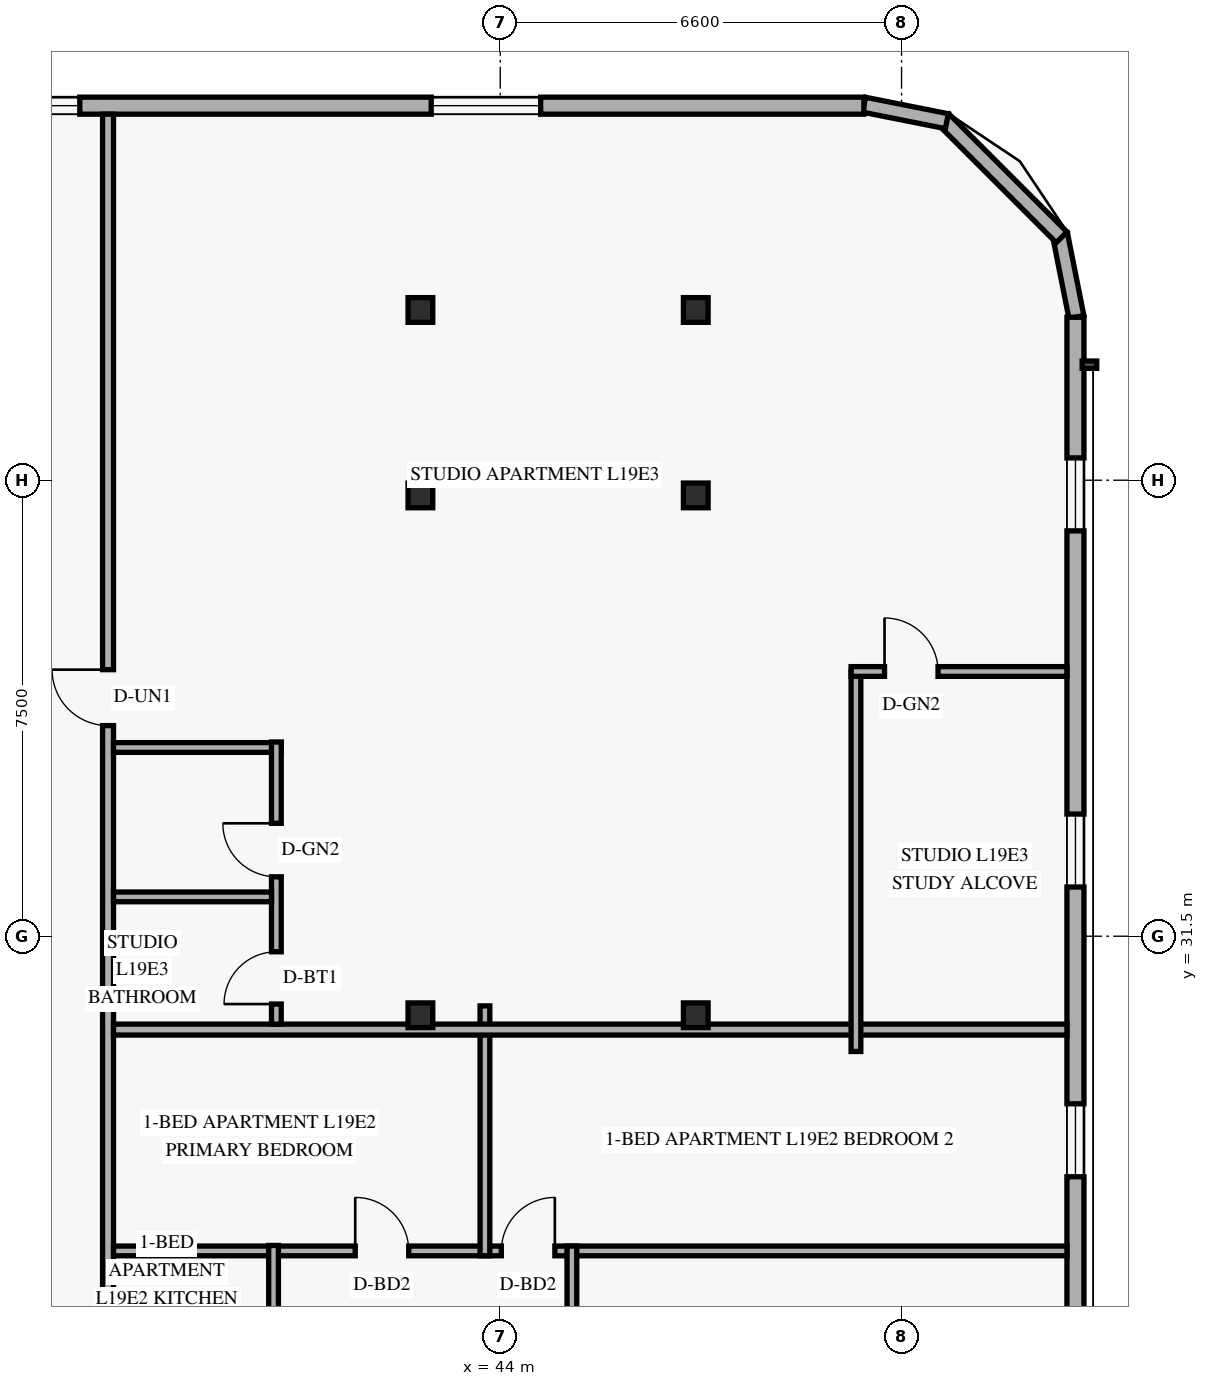
"""IFC4 building model, lengths in metres.
Left out: names, types, materials, properties, quantities, classifications, styles, units other than length and angle.
Written with IfcOpenShell. Run it as: python <this file> out.ifc"""

import sys

from ifc_helpers import new_model, si_unit, direction, frame, frame_2d, origin, origin_2d, place, context, subcontext, project, spatial, rectangle, hollow_rectangle, extrude, element, fill, save


model = new_model("IFC4")
c1 = context("Model", 3, precision=1e-05, world=origin(), true_north=direction((0.0, 1.0)))
c2 = subcontext(c1, "Body", "Model", "MODEL_VIEW")
j1 = project(units=[si_unit("LENGTHUNIT", "METRE"), si_unit("PLANEANGLEUNIT", "RADIAN")], contexts=[c1])
p1 = place(None, origin())
s1 = spatial("IfcSite", under=j1, at=p1, CompositionType="ELEMENT")
p2 = place(p1, origin())
s2 = spatial("IfcBuilding", under=s1, at=p2, CompositionType="ELEMENT")
p3 = place(p2, frame((0.0, 0.0, 76.8)))
s3 = spatial("IfcBuildingStorey", under=s2, at=p3, CompositionType="ELEMENT", Elevation=76.8)
for number, where, z_axis, x_axis in (
    (1, (42.624, 30.2, 0.0), (0.035, 0.0, 0.999), (0.0, 1.0, 0.0)),
    (2, (42.624, 38.75, 0.0), (0.035, 0.0, 0.999), (0.0, 1.0, 0.0)),
    (3, (42.624, 41.8, 0.0), (0.035, 0.0, 0.999), (0.0, 1.0, 0.0)),
):
    element("IfcColumn", number, at=place(p3, frame(where, z_axis=z_axis, x_axis=x_axis)), inside=s3, PredefinedType="COLUMN", context=c2, shape_type="SweptSolid", body=[
        extrude(hollow_rectangle(XDim=0.406, YDim=0.406, WallThickness=0.016, at=origin_2d()), origin(), (0.0, 0.0, 1.0), 3.602),
    ])
for number, where, z_axis, x_axis in (
    (4, (47.111, 30.2, 0.0), (0.058, 0.0, 0.998), (0.0, 1.0, 0.0)),
    (5, (47.111, 38.75, 0.0), (0.058, 0.0, 0.998), (0.0, 1.0, 0.0)),
    (6, (47.111, 41.8, 0.0), (0.058, 0.0, 0.998), (0.0, 1.0, 0.0)),
):
    element("IfcColumn", number, at=place(p3, frame(where, z_axis=z_axis, x_axis=x_axis)), inside=s3, PredefinedType="COLUMN", context=c2, shape_type="SweptSolid", body=[
        extrude(hollow_rectangle(XDim=0.406, YDim=0.406, WallThickness=0.016, at=origin_2d()), origin(), (0.0, 0.0, 1.0), 3.606),
    ])
p4 = place(p3, frame((53.476, 41.684, 0.0), z_axis=(0.0, 0.0, 1.0), x_axis=(-0.195000137217, 0.980803214965, 0.0)))
e7 = element("IfcWall", 7, at=p4, inside=s3, PredefinedType="SOLIDWALL", context=c2, shape_type="SweptSolid", body=[
    extrude(rectangle(XDim=1.388, YDim=0.25, at=frame_2d((0.694, 0.0))), origin(), (0.0, 0.0, 1.0), 3.36),
])
p5 = place(p3, frame((53.232, 42.995, 0.0), z_axis=(0.0, 0.0, 1.0), x_axis=(-0.707151344399, 0.707062215165, 0.0)))
e8 = element("IfcWall", 8, at=p5, inside=s3, PredefinedType="SOLIDWALL", context=c2, shape_type="SweptSolid", body=[
    extrude(rectangle(XDim=2.739, YDim=0.25, at=frame_2d((1.37, 0.0))), origin(), (0.0, 0.0, 1.0), 3.36),
])
p6 = place(p3, frame((51.345, 44.905, 0.0), z_axis=(0.0, 0.0, 1.0), x_axis=(-0.980809899341, 0.19496651342, 0.0)))
e9 = element("IfcWall", 9, at=p6, inside=s3, PredefinedType="SOLIDWALL", context=c2, shape_type="SweptSolid", body=[
    extrude(rectangle(XDim=1.389, YDim=0.25, at=frame_2d((0.694, 0.0))), origin(), (0.0, 0.0, 1.0), 3.36),
])
p7 = place(p3, frame((53.46, 6.32, 0.0), z_axis=(0.0, 0.0, 1.0), x_axis=(0.0, 1.0, 0.0)))
e10 = element("IfcWall", 10, at=p7, inside=s3, PredefinedType="SOLIDWALL", context=c2, shape_type="SweptSolid", body=[
    extrude(rectangle(XDim=35.36, YDim=0.28, at=frame_2d((17.68, 0.0))), origin(), (0.0, 0.0, 1.0), 3.36),
])
p8 = place(p7, frame((4.24, 0.0, 0.85)))
e11 = element("IfcOpeningElement", 11, at=p8, cuts=e10, PredefinedType="OPENING", context=c2, shape_type="SweptSolid", body=[
    extrude(rectangle(XDim=1.2, YDim=1.5, at=frame_2d((0.6, 0.75))), frame((0.0, 0.15, 0.0), z_axis=(0.0, -1.0, 0.0), x_axis=(1.0, 0.0, 0.0)), (0.0, 0.0, 1.0), 0.3),
])
p9 = place(p7, frame((13.982, 0.0, 0.85)))
e12 = element("IfcOpeningElement", 12, at=p9, cuts=e10, PredefinedType="OPENING", context=c2, shape_type="SweptSolid", body=[
    extrude(rectangle(XDim=1.2, YDim=1.5, at=frame_2d((0.6, 0.75))), frame((0.0, 0.15, 0.0), z_axis=(0.0, -1.0, 0.0), x_axis=(1.0, 0.0, 0.0)), (0.0, 0.0, 1.0), 0.3),
])
p10 = place(p7, frame((21.224, 0.0, 0.85)))
e13 = element("IfcOpeningElement", 13, at=p10, cuts=e10, PredefinedType="OPENING", context=c2, shape_type="SweptSolid", body=[
    extrude(rectangle(XDim=1.2, YDim=1.5, at=frame_2d((0.6, 0.75))), frame((0.0, 0.15, 0.0), z_axis=(0.0, -1.0, 0.0), x_axis=(1.0, 0.0, 0.0)), (0.0, 0.0, 1.0), 0.3),
])
p11 = place(p7, frame((25.989, 0.0, 0.85)))
e14 = element("IfcOpeningElement", 14, at=p11, cuts=e10, PredefinedType="OPENING", context=c2, shape_type="SweptSolid", body=[
    extrude(rectangle(XDim=1.2, YDim=1.5, at=frame_2d((0.6, 0.75))), frame((0.0, 0.15, 0.0), z_axis=(0.0, -1.0, 0.0), x_axis=(1.0, 0.0, 0.0)), (0.0, 0.0, 1.0), 0.3),
])
p12 = place(p7, frame((31.847, 0.0, 0.85)))
e15 = element("IfcOpeningElement", 15, at=p12, cuts=e10, PredefinedType="OPENING", context=c2, shape_type="SweptSolid", body=[
    extrude(rectangle(XDim=1.2, YDim=1.5, at=frame_2d((0.6, 0.75))), frame((0.0, 0.15, 0.0), z_axis=(0.0, -1.0, 0.0), x_axis=(1.0, 0.0, 0.0)), (0.0, 0.0, 1.0), 0.3),
])
p13 = place(p3, frame((49.98, 45.16, 0.0), z_axis=(0.0, 0.0, 1.0), x_axis=(-1.0, 0.0, 0.0)))
e16 = element("IfcWall", 16, at=p13, inside=s3, PredefinedType="SOLIDWALL", context=c2, shape_type="SweptSolid", body=[
    extrude(rectangle(XDim=36.56, YDim=0.28, at=frame_2d((18.28, 0.0))), origin(), (0.0, 0.0, 1.0), 3.36),
])
p14 = place(p13, frame((31.545, 0.0, 0.85)))
e17 = element("IfcOpeningElement", 17, at=p14, cuts=e16, PredefinedType="OPENING", context=c2, shape_type="SweptSolid", body=[
    extrude(rectangle(XDim=1.8, YDim=1.6, at=frame_2d((0.9, 0.8))), frame((0.0, 0.15, 0.0), z_axis=(0.0, -1.0, 0.0), x_axis=(1.0, 0.0, 0.0)), (0.0, 0.0, 1.0), 0.3),
])
p15 = place(p13, frame((26.68, 0.0, 0.85)))
e18 = element("IfcOpeningElement", 18, at=p15, cuts=e16, PredefinedType="OPENING", context=c2, shape_type="SweptSolid", body=[
    extrude(rectangle(XDim=1.2, YDim=1.5, at=frame_2d((0.6, 0.75))), frame((0.0, 0.15, 0.0), z_axis=(0.0, -1.0, 0.0), x_axis=(1.0, 0.0, 0.0)), (0.0, 0.0, 1.0), 0.3),
])
p16 = place(p13, frame((22.237, 0.0, 0.85)))
e19 = element("IfcOpeningElement", 19, at=p16, cuts=e16, PredefinedType="OPENING", context=c2, shape_type="SweptSolid", body=[
    extrude(rectangle(XDim=1.8, YDim=1.6, at=frame_2d((0.9, 0.8))), frame((0.0, 0.15, 0.0), z_axis=(0.0, -1.0, 0.0), x_axis=(1.0, 0.0, 0.0)), (0.0, 0.0, 1.0), 0.3),
])
p17 = place(p13, frame((16.402, 0.0, 0.85)))
e20 = element("IfcOpeningElement", 20, at=p17, cuts=e16, PredefinedType="OPENING", context=c2, shape_type="SweptSolid", body=[
    extrude(rectangle(XDim=1.8, YDim=1.6, at=frame_2d((0.9, 0.8))), frame((0.0, 0.15, 0.0), z_axis=(0.0, -1.0, 0.0), x_axis=(1.0, 0.0, 0.0)), (0.0, 0.0, 1.0), 0.3),
])
p18 = place(p13, frame((12.895, 0.0, 0.85)))
e21 = element("IfcOpeningElement", 21, at=p18, cuts=e16, PredefinedType="OPENING", context=c2, shape_type="SweptSolid", body=[
    extrude(rectangle(XDim=1.2, YDim=1.5, at=frame_2d((0.6, 0.75))), frame((0.0, 0.15, 0.0), z_axis=(0.0, -1.0, 0.0), x_axis=(1.0, 0.0, 0.0)), (0.0, 0.0, 1.0), 0.3),
])
p19 = place(p13, frame((5.315, 0.0, 0.85)))
e22 = element("IfcOpeningElement", 22, at=p19, cuts=e16, PredefinedType="OPENING", context=c2, shape_type="SweptSolid", body=[
    extrude(rectangle(XDim=1.8, YDim=1.6, at=frame_2d((0.9, 0.8))), frame((0.0, 0.15, 0.0), z_axis=(0.0, -1.0, 0.0), x_axis=(1.0, 0.0, 0.0)), (0.0, 0.0, 1.0), 0.3),
])
p20 = place(p3, frame((37.55, 2.98, 0.0), z_axis=(0.0, 0.0, 1.0), x_axis=(0.0, 1.0, 0.0)))
e23 = element("IfcWall", 23, at=p20, inside=s3, PredefinedType="STANDARD", context=c2, shape_type="SweptSolid", body=[
    extrude(rectangle(XDim=42.04, YDim=0.18, at=frame_2d((21.02, 0.0))), origin(), (0.0, 0.0, 1.0), 2.731),
])
p21 = place(p20, frame((8.898, 0.0, 0.0)))
e24 = element("IfcOpeningElement", 24, at=p21, cuts=e23, PredefinedType="OPENING", context=c2, shape_type="SweptSolid", body=[
    extrude(rectangle(XDim=0.92, YDim=2.15, at=frame_2d((0.46, 1.075))), frame((0.0, 0.1, 0.0), z_axis=(0.0, -1.0, 0.0), x_axis=(1.0, 0.0, 0.0)), (0.0, 0.0, 1.0), 0.2),
])
p22 = place(p20, frame((17.337, 0.0, 0.0)))
e25 = element("IfcOpeningElement", 25, at=p22, cuts=e23, PredefinedType="OPENING", context=c2, shape_type="SweptSolid", body=[
    extrude(rectangle(XDim=0.92, YDim=2.15, at=frame_2d((0.46, 1.075))), frame((0.0, 0.1, 0.0), z_axis=(0.0, -1.0, 0.0), x_axis=(1.0, 0.0, 0.0)), (0.0, 0.0, 1.0), 0.2),
])
p23 = place(p20, frame((31.984, 0.0, 0.0)))
e26 = element("IfcOpeningElement", 26, at=p23, cuts=e23, PredefinedType="OPENING", context=c2, shape_type="SweptSolid", body=[
    extrude(rectangle(XDim=0.92, YDim=2.15, at=frame_2d((0.46, 1.075))), frame((0.0, 0.1, 0.0), z_axis=(0.0, -1.0, 0.0), x_axis=(1.0, 0.0, 0.0)), (0.0, 0.0, 1.0), 0.2),
])
p24 = place(p3, frame((37.64, 26.324, 0.0), z_axis=(0.0, 0.0, 1.0), x_axis=(1.0, 0.0, 0.0)))
e27 = element("IfcWall", 27, at=p24, inside=s3, PredefinedType="PARTITIONING", context=c2, shape_type="SweptSolid", body=[
    extrude(rectangle(XDim=15.68, YDim=0.16, at=frame_2d((7.84, 0.0))), origin(), (0.0, 0.0, 1.0), 2.731),
])
p25 = place(p24, frame((3.975, 0.0, 0.0)))
e28 = element("IfcOpeningElement", 28, at=p25, cuts=e27, PredefinedType="OPENING", context=c2, shape_type="SweptSolid", body=[
    extrude(rectangle(XDim=0.88, YDim=2.14, at=frame_2d((0.44, 1.07))), frame((0.0, 0.09, 0.0), z_axis=(0.0, -1.0, 0.0), x_axis=(1.0, 0.0, 0.0)), (0.0, 0.0, 1.0), 0.18),
])
p26 = place(p24, frame((6.378, 0.0, 0.0)))
e29 = element("IfcOpeningElement", 29, at=p26, cuts=e27, PredefinedType="OPENING", context=c2, shape_type="SweptSolid", body=[
    extrude(rectangle(XDim=0.88, YDim=2.14, at=frame_2d((0.44, 1.07))), frame((0.0, 0.09, 0.0), z_axis=(0.0, -1.0, 0.0), x_axis=(1.0, 0.0, 0.0)), (0.0, 0.0, 1.0), 0.18),
])
p27 = place(p3, frame((40.272, 21.527, 0.0), z_axis=(0.0, 0.0, 1.0), x_axis=(0.0, 1.0, 0.0)))
e30 = element("IfcWall", 30, at=p27, inside=s3, PredefinedType="PLUMBINGWALL", context=c2, shape_type="SweptSolid", body=[
    extrude(rectangle(XDim=4.887, YDim=0.16, at=frame_2d((2.443, 0.0))), origin(), (0.0, 0.0, 1.0), 3.36),
])
p28 = place(p27, frame((0.42, 0.0, 0.0)))
e31 = element("IfcOpeningElement", 31, at=p28, cuts=e30, PredefinedType="OPENING", context=c2, shape_type="SweptSolid", body=[
    extrude(rectangle(XDim=0.86, YDim=2.12, at=frame_2d((0.43, 1.06))), frame((0.0, 0.09, 0.0), z_axis=(0.0, -1.0, 0.0), x_axis=(1.0, 0.0, 0.0)), (0.0, 0.0, 1.0), 0.18),
])
p29 = place(p27, frame((2.585, 0.0, 0.0)))
e32 = element("IfcOpeningElement", 32, at=p29, cuts=e30, PredefinedType="OPENING", context=c2, shape_type="SweptSolid", body=[
    extrude(rectangle(XDim=0.88, YDim=2.12, at=frame_2d((0.44, 1.06))), frame((0.0, 0.09, 0.0), z_axis=(0.0, -1.0, 0.0), x_axis=(1.0, 0.0, 0.0)), (0.0, 0.0, 1.0), 0.18),
])
p30 = place(p3, frame((45.178, 15.12, 0.0), z_axis=(0.0, 0.0, 1.0), x_axis=(0.0, 1.0, 0.0)))
e33 = element("IfcWall", 33, at=p30, inside=s3, PredefinedType="PARTITIONING", context=c2, shape_type="SweptSolid", body=[
    extrude(rectangle(XDim=11.284, YDim=0.16, at=frame_2d((5.642, 0.0))), origin(), (0.0, 0.0, 1.0), 2.731),
])
p31 = place(p30, frame((4.882, 0.0, 0.0)))
e34 = element("IfcOpeningElement", 34, at=p31, cuts=e33, PredefinedType="OPENING", context=c2, shape_type="SweptSolid", body=[
    extrude(rectangle(XDim=0.95, YDim=2.15, at=frame_2d((0.475, 1.075))), frame((0.0, 0.09, 0.0), z_axis=(0.0, -1.0, 0.0), x_axis=(1.0, 0.0, 0.0)), (0.0, 0.0, 1.0), 0.18),
])
p32 = place(p3, frame((43.748, 26.244, 0.0), z_axis=(0.0, 0.0, 1.0), x_axis=(0.0, 1.0, 0.0)))
e35 = element("IfcWall", 35, at=p32, inside=s3, PredefinedType="PARTITIONING", context=c2, shape_type="SweptSolid", body=[
    extrude(rectangle(XDim=4.11, YDim=0.16, at=frame_2d((2.055, 0.0))), origin(), (0.0, 0.0, 1.0), 2.731),
])
p33 = place(p3, frame((37.64, 29.964, 0.0), z_axis=(0.0, 0.0, 1.0), x_axis=(1.0, 0.0, 0.0)))
e36 = element("IfcWall", 36, at=p33, inside=s3, PredefinedType="PARTITIONING", context=c2, shape_type="SweptSolid", body=[
    extrude(rectangle(XDim=15.68, YDim=0.18, at=frame_2d((7.84, 0.0))), origin(), (0.0, 0.0, 1.0), 2.731),
])
p34 = place(p3, frame((37.64, 34.604, 0.0), z_axis=(0.0, 0.0, 1.0), x_axis=(1.0, 0.0, 0.0)))
e37 = element("IfcWall", 37, at=p34, inside=s3, PredefinedType="PLUMBINGWALL", context=c2, shape_type="SweptSolid", body=[
    extrude(rectangle(XDim=2.758, YDim=0.16, at=frame_2d((1.379, 0.0))), origin(), (0.0, 0.0, 1.0), 2.988),
])
p35 = place(p3, frame((40.318, 30.054, 0.0), z_axis=(0.0, 0.0, 1.0), x_axis=(0.0, 1.0, 0.0)))
e38 = element("IfcWall", 38, at=p35, inside=s3, PredefinedType="PLUMBINGWALL", context=c2, shape_type="SweptSolid", body=[
    extrude(rectangle(XDim=4.64, YDim=0.16, at=frame_2d((2.32, 0.0))), origin(), (0.0, 0.0, 1.0), 2.731),
])
p36 = place(p35, frame((0.33, 0.0, 0.0)))
e39 = element("IfcOpeningElement", 39, at=p36, cuts=e38, PredefinedType="OPENING", context=c2, shape_type="SweptSolid", body=[
    extrude(rectangle(XDim=0.86, YDim=2.12, at=frame_2d((0.43, 1.06))), frame((0.0, 0.09, 0.0), z_axis=(0.0, -1.0, 0.0), x_axis=(1.0, 0.0, 0.0)), (0.0, 0.0, 1.0), 0.18),
])
p37 = place(p35, frame((2.423, 0.0, 0.0)))
e40 = element("IfcOpeningElement", 40, at=p37, cuts=e38, PredefinedType="OPENING", context=c2, shape_type="SweptSolid", body=[
    extrude(rectangle(XDim=0.88, YDim=2.12, at=frame_2d((0.44, 1.06))), frame((0.0, 0.09, 0.0), z_axis=(0.0, -1.0, 0.0), x_axis=(1.0, 0.0, 0.0)), (0.0, 0.0, 1.0), 0.18),
])
p38 = place(p3, frame((37.64, 32.147, 0.0), z_axis=(0.0, 0.0, 1.0), x_axis=(1.0, 0.0, 0.0)))
e41 = element("IfcWall", 41, at=p38, inside=s3, PredefinedType="PLUMBINGWALL", context=c2, shape_type="SweptSolid", body=[
    extrude(rectangle(XDim=2.598, YDim=0.16, at=frame_2d((1.299, 0.0))), origin(), (0.0, 0.0, 1.0), 3.36),
])
p39 = place(p3, frame((49.85, 29.604, 0.0), z_axis=(0.0, 0.0, 1.0), x_axis=(0.0, 1.0, 0.0)))
e42 = element("IfcWall", 42, at=p39, inside=s3, PredefinedType="PARTITIONING", context=c2, shape_type="SweptSolid", body=[
    extrude(rectangle(XDim=6.25, YDim=0.16, at=frame_2d((3.125, 0.0))), origin(), (0.0, 0.0, 1.0), 3.36),
])
p40 = place(p3, frame((49.77, 35.854, 0.0), z_axis=(0.0, 0.0, 1.0), x_axis=(1.0, 0.0, 0.0)))
e43 = element("IfcWall", 43, at=p40, inside=s3, PredefinedType="PARTITIONING", context=c2, shape_type="SweptSolid", body=[
    extrude(rectangle(XDim=3.55, YDim=0.16, at=frame_2d((1.775, 0.0))), origin(), (0.0, 0.0, 1.0), 3.36),
])
p41 = place(p40, frame((0.55, 0.0, 0.0)))
e44 = element("IfcOpeningElement", 44, at=p41, cuts=e43, PredefinedType="OPENING", context=c2, shape_type="SweptSolid", body=[
    extrude(rectangle(XDim=0.88, YDim=2.12, at=frame_2d((0.44, 1.06))), frame((0.0, 0.09, 0.0), z_axis=(0.0, -1.0, 0.0), x_axis=(1.0, 0.0, 0.0)), (0.0, 0.0, 1.0), 0.18),
])
p42 = place(p10, origin())
e45 = element("IfcWindow", 45, at=p42, inside=s3, PartitioningType="SINGLE_PANEL", PredefinedType="WINDOW", context=c2, shape_type="SweptSolid", body=[
    extrude(rectangle(XDim=1.2, YDim=1.5, at=frame_2d((0.6, 0.75))), frame((0.0, 0.03, 0.0), z_axis=(0.0, -1.0, 0.0), x_axis=(1.0, 0.0, 0.0)), (0.0, 0.0, 1.0), 0.06),
])
fill(e13, e45)
p43 = place(p11, origin())
e46 = element("IfcWindow", 46, at=p43, inside=s3, PartitioningType="SINGLE_PANEL", PredefinedType="WINDOW", context=c2, shape_type="SweptSolid", body=[
    extrude(rectangle(XDim=1.2, YDim=1.5, at=frame_2d((0.6, 0.75))), frame((0.0, 0.03, 0.0), z_axis=(0.0, -1.0, 0.0), x_axis=(1.0, 0.0, 0.0)), (0.0, 0.0, 1.0), 0.06),
])
fill(e14, e46)
p44 = place(p12, origin())
e47 = element("IfcWindow", 47, at=p44, inside=s3, PartitioningType="SINGLE_PANEL", PredefinedType="WINDOW", context=c2, shape_type="SweptSolid", body=[
    extrude(rectangle(XDim=1.2, YDim=1.5, at=frame_2d((0.6, 0.75))), frame((0.0, 0.03, 0.0), z_axis=(0.0, -1.0, 0.0), x_axis=(1.0, 0.0, 0.0)), (0.0, 0.0, 1.0), 0.06),
])
fill(e15, e47)
p45 = place(p18, origin())
e48 = element("IfcWindow", 48, at=p45, inside=s3, PartitioningType="SINGLE_PANEL", PredefinedType="WINDOW", context=c2, shape_type="SweptSolid", body=[
    extrude(rectangle(XDim=1.2, YDim=1.5, at=frame_2d((0.6, 0.75))), frame((0.0, 0.03, 0.0), z_axis=(0.0, -1.0, 0.0), x_axis=(1.0, 0.0, 0.0)), (0.0, 0.0, 1.0), 0.06),
])
fill(e21, e48)
p46 = place(p19, origin())
e49 = element("IfcWindow", 49, at=p46, inside=s3, PartitioningType="SINGLE_PANEL", PredefinedType="WINDOW", context=c2, shape_type="SweptSolid", body=[
    extrude(rectangle(XDim=1.8, YDim=1.6, at=frame_2d((0.9, 0.8))), frame((0.0, 0.03, 0.0), z_axis=(0.0, -1.0, 0.0), x_axis=(1.0, 0.0, 0.0)), (0.0, 0.0, 1.0), 0.06),
])
fill(e22, e49)
p47 = place(p25, origin())
e50 = element("IfcDoor", 50, at=p47, inside=s3, OperationType="SINGLE_SWING_LEFT", PredefinedType="DOOR", context=c2, shape_type="SweptSolid", body=[
    extrude(rectangle(XDim=0.88, YDim=2.14, at=frame_2d((0.44, 1.07))), frame((0.0, 0.025, 0.0), z_axis=(0.0, -1.0, 0.0), x_axis=(1.0, 0.0, 0.0)), (0.0, 0.0, 1.0), 0.05),
])
fill(e28, e50)
p48 = place(p26, origin())
e51 = element("IfcDoor", 51, at=p48, inside=s3, OperationType="SINGLE_SWING_RIGHT", PredefinedType="DOOR", context=c2, shape_type="SweptSolid", body=[
    extrude(rectangle(XDim=0.88, YDim=2.14, at=frame_2d((0.44, 1.07))), frame((0.0, 0.025, 0.0), z_axis=(0.0, -1.0, 0.0), x_axis=(1.0, 0.0, 0.0)), (0.0, 0.0, 1.0), 0.05),
])
fill(e29, e51)
p49 = place(p41, origin())
e52 = element("IfcDoor", 52, at=p49, inside=s3, OperationType="SINGLE_SWING_LEFT", PredefinedType="DOOR", context=c2, shape_type="SweptSolid", body=[
    extrude(rectangle(XDim=0.88, YDim=2.12, at=frame_2d((0.44, 1.06))), frame((0.0, 0.025, 0.0), z_axis=(0.0, -1.0, 0.0), x_axis=(1.0, 0.0, 0.0)), (0.0, 0.0, 1.0), 0.05),
])
fill(e44, e52)
p50 = place(p23, origin())
e53 = element("IfcDoor", 53, at=p50, inside=s3, OperationType="SINGLE_SWING_RIGHT", PredefinedType="DOOR", context=c2, shape_type="SweptSolid", body=[
    extrude(rectangle(XDim=0.92, YDim=2.15, at=frame_2d((0.46, 1.075))), frame((0.0, 0.025, 0.0), z_axis=(0.0, -1.0, 0.0), x_axis=(1.0, 0.0, 0.0)), (0.0, 0.0, 1.0), 0.05),
])
fill(e26, e53)
p51 = place(p36, origin())
e54 = element("IfcDoor", 54, at=p51, inside=s3, OperationType="SINGLE_SWING_LEFT", PredefinedType="DOOR", context=c2, shape_type="SweptSolid", body=[
    extrude(rectangle(XDim=0.86, YDim=2.12, at=frame_2d((0.43, 1.06))), frame((0.0, 0.025, 0.0), z_axis=(0.0, -1.0, 0.0), x_axis=(1.0, 0.0, 0.0)), (0.0, 0.0, 1.0), 0.05),
])
fill(e39, e54)
p52 = place(p37, origin())
e55 = element("IfcDoor", 55, at=p52, inside=s3, OperationType="SINGLE_SWING_RIGHT", PredefinedType="DOOR", context=c2, shape_type="SweptSolid", body=[
    extrude(rectangle(XDim=0.88, YDim=2.12, at=frame_2d((0.44, 1.06))), frame((0.0, 0.025, 0.0), z_axis=(0.0, -1.0, 0.0), x_axis=(1.0, 0.0, 0.0)), (0.0, 0.0, 1.0), 0.05),
])
fill(e40, e55)
save(model, sys.argv[1])
